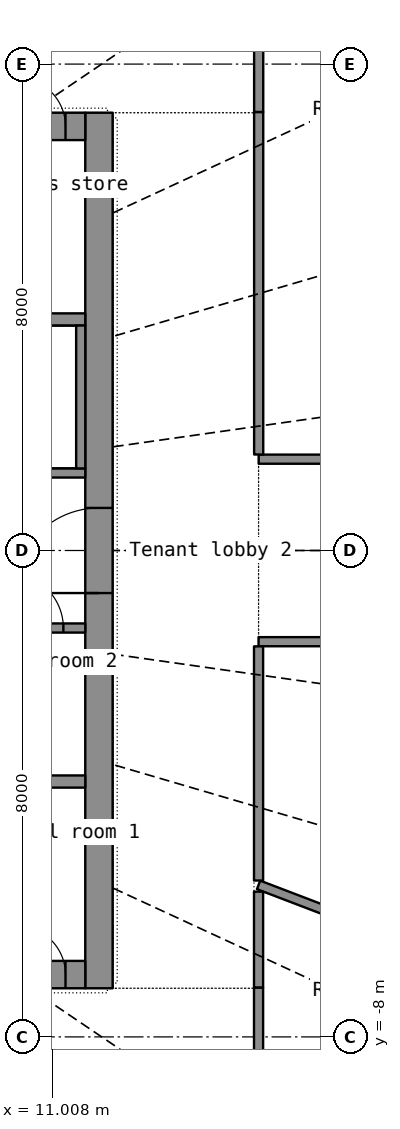
"""IFC4 building model, lengths in metres.
Left out: names, types, materials, properties, quantities, classifications, styles, units other than length and angle.
Written with IfcOpenShell. Run it as: python <this file> out.ifc"""

import sys

from ifc_helpers import new_model, si_unit, direction, frame, frame_2d, origin, place, context, subcontext, project, spatial, rectangle, extrude, element, fill, save


model = new_model("IFC4")
c1 = context("Model", 3, precision=1e-05, world=origin(), true_north=direction((0.0, 1.0)))
c2 = subcontext(c1, "Body", "Model", "MODEL_VIEW")
j1 = project(units=[si_unit("LENGTHUNIT", "METRE"), si_unit("PLANEANGLEUNIT", "RADIAN")], contexts=[c1])
p1 = place(None, origin())
s1 = spatial("IfcSite", under=j1, at=p1, CompositionType="ELEMENT")
p2 = place(p1, origin())
s2 = spatial("IfcBuilding", under=s1, at=p2, CompositionType="ELEMENT")
p3 = place(p2, frame((0.0, 0.0, 157.1)))
s3 = spatial("IfcBuildingStorey", under=s2, at=p3, CompositionType="ELEMENT", Elevation=157.1)
p4 = place(p3, frame((11.775, -7.2, 0.0), z_axis=(0.0, 0.0, 1.0), x_axis=(0.0, 1.0, 0.0)))
e1 = element("IfcWall", 1, at=p4, inside=s3, PredefinedType="SHEAR", context=c2, shape_type="SweptSolid", body=[
    extrude(rectangle(XDim=14.4, YDim=0.45, at=frame_2d((7.2, 0.0))), origin(), (0.0, 0.0, 1.0), 3.3),
])
p5 = place(p4, frame((6.5, 0.0, 0.0)))
e2 = element("IfcOpeningElement", 2, at=p5, cuts=e1, PredefinedType="OPENING", context=c2, shape_type="SweptSolid", body=[
    extrude(rectangle(XDim=1.4, YDim=2.2, at=frame_2d((0.7, 1.1))), frame((0.0, 0.235, 0.0), z_axis=(0.0, -1.0, 0.0), x_axis=(1.0, 0.0, 0.0)), (0.0, 0.0, 1.0), 0.47),
])
p6 = place(p3, frame((-11.55, -6.975, 0.0), z_axis=(0.0, 0.0, 1.0), x_axis=(1.0, 0.0, 0.0)))
e3 = element("IfcWall", 3, at=p6, inside=s3, PredefinedType="SHEAR", context=c2, shape_type="SweptSolid", body=[
    extrude(rectangle(XDim=23.1, YDim=0.45, at=frame_2d((11.55, 0.0))), origin(), (0.0, 0.0, 1.0), 3.3),
])
p7 = place(p6, frame((20.0, 0.0, 0.0)))
e4 = element("IfcOpeningElement", 4, at=p7, cuts=e3, PredefinedType="OPENING", context=c2, shape_type="SweptSolid", body=[
    extrude(rectangle(XDim=1.1, YDim=2.2, at=frame_2d((0.55, 1.1))), frame((0.0, 0.235, 0.0), z_axis=(0.0, -1.0, 0.0), x_axis=(1.0, 0.0, 0.0)), (0.0, 0.0, 1.0), 0.47),
])
p8 = place(p6, frame((3.1, 0.0, 0.0)))
e5 = element("IfcOpeningElement", 5, at=p8, cuts=e3, PredefinedType="OPENING", context=c2, shape_type="SweptSolid", body=[
    extrude(rectangle(XDim=0.9, YDim=2.1, at=frame_2d((0.45, 1.05))), frame((0.0, 0.235, 0.0), z_axis=(0.0, -1.0, 0.0), x_axis=(1.0, 0.0, 0.0)), (0.0, 0.0, 1.0), 0.47),
])
p9 = place(p6, frame((9.1, 0.0, 0.0)))
e6 = element("IfcOpeningElement", 6, at=p9, cuts=e3, PredefinedType="OPENING", context=c2, shape_type="SweptSolid", body=[
    extrude(rectangle(XDim=0.9, YDim=2.1, at=frame_2d((0.45, 1.05))), frame((0.0, 0.235, 0.0), z_axis=(0.0, -1.0, 0.0), x_axis=(1.0, 0.0, 0.0)), (0.0, 0.0, 1.0), 0.47),
])
p10 = place(p6, frame((16.1, 0.0, 0.0)))
e7 = element("IfcOpeningElement", 7, at=p10, cuts=e3, PredefinedType="OPENING", context=c2, shape_type="SweptSolid", body=[
    extrude(rectangle(XDim=0.9, YDim=2.1, at=frame_2d((0.45, 1.05))), frame((0.0, 0.235, 0.0), z_axis=(0.0, -1.0, 0.0), x_axis=(1.0, 0.0, 0.0)), (0.0, 0.0, 1.0), 0.47),
])
p11 = place(p6, frame((0.325, 0.0, 0.0)))
e8 = element("IfcOpeningElement", 8, at=p11, cuts=e3, PredefinedType="OPENING", context=c2, shape_type="SweptSolid", body=[
    extrude(rectangle(XDim=0.8, YDim=2.05, at=frame_2d((0.4, 1.025))), frame((0.0, 0.235, 0.0), z_axis=(0.0, -1.0, 0.0), x_axis=(1.0, 0.0, 0.0)), (0.0, 0.0, 1.0), 0.47),
])
p12 = place(p6, frame((21.975, 0.0, 0.0)))
e9 = element("IfcOpeningElement", 9, at=p12, cuts=e3, PredefinedType="OPENING", context=c2, shape_type="SweptSolid", body=[
    extrude(rectangle(XDim=0.8, YDim=2.05, at=frame_2d((0.4, 1.025))), frame((0.0, 0.235, 0.0), z_axis=(0.0, -1.0, 0.0), x_axis=(1.0, 0.0, 0.0)), (0.0, 0.0, 1.0), 0.47),
])
p13 = place(p3, frame((-11.55, 6.975, 0.0), z_axis=(0.0, 0.0, 1.0), x_axis=(1.0, 0.0, 0.0)))
e10 = element("IfcWall", 10, at=p13, inside=s3, PredefinedType="SHEAR", context=c2, shape_type="SweptSolid", body=[
    extrude(rectangle(XDim=23.1, YDim=0.45, at=frame_2d((11.55, 0.0))), origin(), (0.0, 0.0, 1.0), 3.3),
])
p14 = place(p13, frame((2.0, 0.0, 0.0)))
e11 = element("IfcOpeningElement", 11, at=p14, cuts=e10, PredefinedType="OPENING", context=c2, shape_type="SweptSolid", body=[
    extrude(rectangle(XDim=1.1, YDim=2.2, at=frame_2d((0.55, 1.1))), frame((0.0, 0.235, 0.0), z_axis=(0.0, -1.0, 0.0), x_axis=(1.0, 0.0, 0.0)), (0.0, 0.0, 1.0), 0.47),
])
p15 = place(p13, frame((6.0, 0.0, 0.0)))
e12 = element("IfcOpeningElement", 12, at=p15, cuts=e10, PredefinedType="OPENING", context=c2, shape_type="SweptSolid", body=[
    extrude(rectangle(XDim=1.1, YDim=2.2, at=frame_2d((0.55, 1.1))), frame((0.0, 0.235, 0.0), z_axis=(0.0, -1.0, 0.0), x_axis=(1.0, 0.0, 0.0)), (0.0, 0.0, 1.0), 0.47),
])
p16 = place(p13, frame((8.0, 0.0, 0.0)))
e13 = element("IfcOpeningElement", 13, at=p16, cuts=e10, PredefinedType="OPENING", context=c2, shape_type="SweptSolid", body=[
    extrude(rectangle(XDim=1.1, YDim=2.2, at=frame_2d((0.55, 1.1))), frame((0.0, 0.235, 0.0), z_axis=(0.0, -1.0, 0.0), x_axis=(1.0, 0.0, 0.0)), (0.0, 0.0, 1.0), 0.47),
])
p17 = place(p13, frame((10.0, 0.0, 0.0)))
e14 = element("IfcOpeningElement", 14, at=p17, cuts=e10, PredefinedType="OPENING", context=c2, shape_type="SweptSolid", body=[
    extrude(rectangle(XDim=1.1, YDim=2.2, at=frame_2d((0.55, 1.1))), frame((0.0, 0.235, 0.0), z_axis=(0.0, -1.0, 0.0), x_axis=(1.0, 0.0, 0.0)), (0.0, 0.0, 1.0), 0.47),
])
p18 = place(p13, frame((12.0, 0.0, 0.0)))
e15 = element("IfcOpeningElement", 15, at=p18, cuts=e10, PredefinedType="OPENING", context=c2, shape_type="SweptSolid", body=[
    extrude(rectangle(XDim=1.1, YDim=2.2, at=frame_2d((0.55, 1.1))), frame((0.0, 0.235, 0.0), z_axis=(0.0, -1.0, 0.0), x_axis=(1.0, 0.0, 0.0)), (0.0, 0.0, 1.0), 0.47),
])
p19 = place(p13, frame((14.0, 0.0, 0.0)))
e16 = element("IfcOpeningElement", 16, at=p19, cuts=e10, PredefinedType="OPENING", context=c2, shape_type="SweptSolid", body=[
    extrude(rectangle(XDim=1.1, YDim=2.2, at=frame_2d((0.55, 1.1))), frame((0.0, 0.235, 0.0), z_axis=(0.0, -1.0, 0.0), x_axis=(1.0, 0.0, 0.0)), (0.0, 0.0, 1.0), 0.47),
])
p20 = place(p13, frame((16.0, 0.0, 0.0)))
e17 = element("IfcOpeningElement", 17, at=p20, cuts=e10, PredefinedType="OPENING", context=c2, shape_type="SweptSolid", body=[
    extrude(rectangle(XDim=1.1, YDim=2.2, at=frame_2d((0.55, 1.1))), frame((0.0, 0.235, 0.0), z_axis=(0.0, -1.0, 0.0), x_axis=(1.0, 0.0, 0.0)), (0.0, 0.0, 1.0), 0.47),
])
p21 = place(p13, frame((18.0, 0.0, 0.0)))
e18 = element("IfcOpeningElement", 18, at=p21, cuts=e10, PredefinedType="OPENING", context=c2, shape_type="SweptSolid", body=[
    extrude(rectangle(XDim=1.1, YDim=2.2, at=frame_2d((0.55, 1.1))), frame((0.0, 0.235, 0.0), z_axis=(0.0, -1.0, 0.0), x_axis=(1.0, 0.0, 0.0)), (0.0, 0.0, 1.0), 0.47),
])
p22 = place(p13, frame((20.0, 0.0, 0.0)))
e19 = element("IfcOpeningElement", 19, at=p22, cuts=e10, PredefinedType="OPENING", context=c2, shape_type="SweptSolid", body=[
    extrude(rectangle(XDim=1.1, YDim=2.2, at=frame_2d((0.55, 1.1))), frame((0.0, 0.235, 0.0), z_axis=(0.0, -1.0, 0.0), x_axis=(1.0, 0.0, 0.0)), (0.0, 0.0, 1.0), 0.47),
])
p23 = place(p13, frame((4.1, 0.0, 0.0)))
e20 = element("IfcOpeningElement", 20, at=p23, cuts=e10, PredefinedType="OPENING", context=c2, shape_type="SweptSolid", body=[
    extrude(rectangle(XDim=0.9, YDim=2.1, at=frame_2d((0.45, 1.05))), frame((0.0, 0.235, 0.0), z_axis=(0.0, -1.0, 0.0), x_axis=(1.0, 0.0, 0.0)), (0.0, 0.0, 1.0), 0.47),
])
p24 = place(p13, frame((0.325, 0.0, 0.0)))
e21 = element("IfcOpeningElement", 21, at=p24, cuts=e10, PredefinedType="OPENING", context=c2, shape_type="SweptSolid", body=[
    extrude(rectangle(XDim=0.8, YDim=2.05, at=frame_2d((0.4, 1.025))), frame((0.0, 0.235, 0.0), z_axis=(0.0, -1.0, 0.0), x_axis=(1.0, 0.0, 0.0)), (0.0, 0.0, 1.0), 0.47),
])
p25 = place(p13, frame((21.975, 0.0, 0.0)))
e22 = element("IfcOpeningElement", 22, at=p25, cuts=e10, PredefinedType="OPENING", context=c2, shape_type="SweptSolid", body=[
    extrude(rectangle(XDim=0.8, YDim=2.05, at=frame_2d((0.4, 1.025))), frame((0.0, 0.235, 0.0), z_axis=(0.0, -1.0, 0.0), x_axis=(1.0, 0.0, 0.0)), (0.0, 0.0, 1.0), 0.47),
])
for number, where, z_axis, x_axis in (
    (23, (-11.55, -3.8, 0.0), (0.0, 0.0, 1.0), (1.0, 0.0, 0.0)),
    (24, (-11.55, 3.8, 0.0), (0.0, 0.0, 1.0), (1.0, 0.0, 0.0)),
):
    element("IfcWall", number, at=place(p3, frame(where, z_axis=z_axis, x_axis=x_axis)), inside=s3, PredefinedType="SHEAR", context=c2, shape_type="SweptSolid", body=[
        extrude(rectangle(XDim=23.1, YDim=0.2, at=frame_2d((11.55, 0.0))), origin(), (0.0, 0.0, 1.0), 3.3),
    ])
p26 = place(p3, frame((3.0, -1.275, 0.0), z_axis=(0.0, 0.0, 1.0), x_axis=(1.0, 0.0, 0.0)))
e25 = element("IfcWall", 25, at=p26, inside=s3, PredefinedType="PARTITIONING", context=c2, shape_type="SweptSolid", body=[
    extrude(rectangle(XDim=8.55, YDim=0.15, at=frame_2d((4.275, 0.0))), origin(), (0.0, 0.0, 1.0), 3.3),
])
p27 = place(p26, frame((0.441, 0.0, 0.0)))
e26 = element("IfcOpeningElement", 26, at=p27, cuts=e25, PredefinedType="OPENING", context=c2, shape_type="SweptSolid", body=[
    extrude(rectangle(XDim=0.9, YDim=2.1, at=frame_2d((0.45, 1.05))), frame((0.0, 0.085, 0.0), z_axis=(0.0, -1.0, 0.0), x_axis=(1.0, 0.0, 0.0)), (0.0, 0.0, 1.0), 0.17),
])
p28 = place(p26, frame((2.722, 0.0, 0.0)))
e27 = element("IfcOpeningElement", 27, at=p28, cuts=e25, PredefinedType="OPENING", context=c2, shape_type="SweptSolid", body=[
    extrude(rectangle(XDim=0.85, YDim=2.1, at=frame_2d((0.425, 1.05))), frame((0.0, 0.085, 0.0), z_axis=(0.0, -1.0, 0.0), x_axis=(1.0, 0.0, 0.0)), (0.0, 0.0, 1.0), 0.17),
])
p29 = place(p26, frame((5.221, 0.0, 0.0)))
e28 = element("IfcOpeningElement", 28, at=p29, cuts=e25, PredefinedType="OPENING", context=c2, shape_type="SweptSolid", body=[
    extrude(rectangle(XDim=0.85, YDim=2.1, at=frame_2d((0.425, 1.05))), frame((0.0, 0.085, 0.0), z_axis=(0.0, -1.0, 0.0), x_axis=(1.0, 0.0, 0.0)), (0.0, 0.0, 1.0), 0.17),
])
p30 = place(p26, frame((7.29, 0.0, 0.0)))
e29 = element("IfcOpeningElement", 29, at=p30, cuts=e25, PredefinedType="OPENING", context=c2, shape_type="SweptSolid", body=[
    extrude(rectangle(XDim=0.9, YDim=2.1, at=frame_2d((0.45, 1.05))), frame((0.0, 0.085, 0.0), z_axis=(0.0, -1.0, 0.0), x_axis=(1.0, 0.0, 0.0)), (0.0, 0.0, 1.0), 0.17),
])
p31 = place(p3, frame((3.0, 1.275, 0.0), z_axis=(0.0, 0.0, 1.0), x_axis=(1.0, 0.0, 0.0)))
e30 = element("IfcWall", 30, at=p31, inside=s3, PredefinedType="SHEAR", context=c2, shape_type="SweptSolid", body=[
    extrude(rectangle(XDim=8.55, YDim=0.15, at=frame_2d((4.275, 0.0))), origin(), (0.0, 0.0, 1.0), 3.3),
])
p32 = place(p31, frame((2.05, 0.0, 0.0)))
e31 = element("IfcOpeningElement", 31, at=p32, cuts=e30, PredefinedType="OPENING", context=c2, shape_type="SweptSolid", body=[
    extrude(rectangle(XDim=1.1, YDim=2.15, at=frame_2d((0.55, 1.075))), frame((0.0, 0.085, 0.0), z_axis=(0.0, -1.0, 0.0), x_axis=(1.0, 0.0, 0.0)), (0.0, 0.0, 1.0), 0.17),
])
p33 = place(p31, frame((0.45, 0.0, 0.0)))
e32 = element("IfcOpeningElement", 32, at=p33, cuts=e30, PredefinedType="OPENING", context=c2, shape_type="SweptSolid", body=[
    extrude(rectangle(XDim=0.9, YDim=2.1, at=frame_2d((0.45, 1.05))), frame((0.0, 0.085, 0.0), z_axis=(0.0, -1.0, 0.0), x_axis=(1.0, 0.0, 0.0)), (0.0, 0.0, 1.0), 0.17),
])
p34 = place(p3, frame((11.475, 1.35, 0.0), z_axis=(0.0, 0.0, 1.0), x_axis=(0.0, 1.0, 0.0)))
e33 = element("IfcWall", 33, at=p34, inside=s3, PredefinedType="SHEAR", context=c2, shape_type="SweptSolid", body=[
    extrude(rectangle(XDim=2.35, YDim=0.15, at=frame_2d((1.175, 0.0))), origin(), (0.0, 0.0, 1.0), 3.3),
])
p35 = place(p3, frame((21.56, -8.235, 0.0), z_axis=(0.0, 0.0, 1.0), x_axis=(-0.93417148, 0.356824391, 0.0)))
e34 = element("IfcWall", 34, at=p35, inside=s3, PredefinedType="PARTITIONING", context=c2, shape_type="SweptSolid", body=[
    extrude(rectangle(XDim=7.665, YDim=0.15, at=frame_2d((3.832, 0.0))), origin(), (0.0, 0.0, 1.0), 2.4),
])
p36 = place(p3, frame((21.202, 1.5, 0.0), z_axis=(0.0, 0.0, 1.0), x_axis=(-0.999999948, 0.000323148, 0.0)))
e35 = element("IfcWall", 35, at=p36, inside=s3, PredefinedType="PARTITIONING", context=c2, shape_type="SweptSolid", body=[
    extrude(rectangle(XDim=6.8, YDim=0.15, at=frame_2d((3.4, 0.0))), origin(), (0.0, 0.0, 1.0), 2.4),
])
p37 = place(p36, frame((2.8, 0.0, 0.0)))
e36 = element("IfcOpeningElement", 36, at=p37, cuts=e35, PredefinedType="OPENING", context=c2, shape_type="SweptSolid", body=[
    extrude(rectangle(XDim=1.2, YDim=2.2, at=frame_2d((0.6, 1.1))), frame((0.0, 0.085, 0.0), z_axis=(0.0, -1.0, 0.0), x_axis=(1.0, 0.0, 0.0)), (0.0, 0.0, 1.0), 0.17),
])
p38 = place(p3, frame((14.4, -1.5, 0.0), z_axis=(0.0, 0.0, 1.0), x_axis=(1.0, 0.0, 0.0)))
e37 = element("IfcWall", 37, at=p38, inside=s3, PredefinedType="PARTITIONING", context=c2, shape_type="SweptSolid", body=[
    extrude(rectangle(XDim=6.532, YDim=0.15, at=frame_2d((3.266, 0.0))), origin(), (0.0, 0.0, 1.0), 2.4),
])
p39 = place(p38, frame((2.791, 0.0, 0.0)))
e38 = element("IfcOpeningElement", 38, at=p39, cuts=e37, PredefinedType="OPENING", context=c2, shape_type="SweptSolid", body=[
    extrude(rectangle(XDim=0.95, YDim=2.15, at=frame_2d((0.475, 1.075))), frame((0.0, 0.085, 0.0), z_axis=(0.0, -1.0, 0.0), x_axis=(1.0, 0.0, 0.0)), (0.0, 0.0, 1.0), 0.17),
])
p40 = place(p3, frame((14.402, 1.579, 0.0), z_axis=(0.0, 0.0, 1.0), x_axis=(0.0, 1.0, 0.0)))
e39 = element("IfcWall", 39, at=p40, inside=s3, PredefinedType="PARTITIONING", context=c2, shape_type="SweptSolid", body=[
    extrude(rectangle(XDim=5.633, YDim=0.15, at=frame_2d((2.816, 0.0))), origin(), (0.0, 0.0, 1.0), 2.4),
])
p41 = place(p3, frame((14.4, -5.428, 0.0), z_axis=(0.0, 0.0, 1.0), x_axis=(0.0, 1.0, 0.0)))
e40 = element("IfcWall", 40, at=p41, inside=s3, PredefinedType="PARTITIONING", context=c2, shape_type="SweptSolid", body=[
    extrude(rectangle(XDim=3.851, YDim=0.15, at=frame_2d((1.926, 0.0))), origin(), (0.0, 0.0, 1.0), 2.4),
])
p42 = place(p3, frame((14.402, 7.213, 0.0), z_axis=(0.0, 0.0, 1.0), x_axis=(0.0, 1.0, 0.0)))
e41 = element("IfcWall", 41, at=p42, inside=s3, PredefinedType="PARTITIONING", context=c2, shape_type="SweptSolid", body=[
    extrude(rectangle(XDim=2.312, YDim=0.15, at=frame_2d((1.156, 0.0))), origin(), (0.0, 0.0, 1.0), 2.4),
])
p43 = place(p3, frame((14.4, -9.523, 0.0), z_axis=(0.0, 0.0, 1.0), x_axis=(0.0, 1.0, 0.0)))
e42 = element("IfcWall", 42, at=p43, inside=s3, PredefinedType="PARTITIONING", context=c2, shape_type="SweptSolid", body=[
    extrude(rectangle(XDim=2.335, YDim=0.15, at=frame_2d((1.167, 0.0))), origin(), (0.0, 0.0, 1.0), 2.4),
])
p44 = place(p3, frame((14.4, -7.187, 0.0), z_axis=(0.0, 0.0, 1.0), x_axis=(0.0, 1.0, 0.0)))
e43 = element("IfcWall", 43, at=p44, inside=s3, PredefinedType="PARTITIONING", context=c2, shape_type="SweptSolid", body=[
    extrude(rectangle(XDim=1.576, YDim=0.15, at=frame_2d((0.788, 0.0))), origin(), (0.0, 0.0, 1.0), 2.4),
])
p45 = place(p12, origin())
e44 = element("IfcDoor", 44, at=p45, inside=s3, OperationType="SINGLE_SWING_LEFT", PredefinedType="DOOR", context=c2, shape_type="SweptSolid", body=[
    extrude(rectangle(XDim=0.8, YDim=2.05, at=frame_2d((0.4, 1.025))), frame((0.0, 0.025, 0.0), z_axis=(0.0, -1.0, 0.0), x_axis=(1.0, 0.0, 0.0)), (0.0, 0.0, 1.0), 0.05),
])
fill(e9, e44)
p46 = place(p25, origin())
e45 = element("IfcDoor", 45, at=p46, inside=s3, OperationType="SINGLE_SWING_LEFT", PredefinedType="DOOR", context=c2, shape_type="SweptSolid", body=[
    extrude(rectangle(XDim=0.8, YDim=2.05, at=frame_2d((0.4, 1.025))), frame((0.0, 0.025, 0.0), z_axis=(0.0, -1.0, 0.0), x_axis=(1.0, 0.0, 0.0)), (0.0, 0.0, 1.0), 0.05),
])
fill(e22, e45)
p47 = place(p5, origin())
e46 = element("IfcDoor", 46, at=p47, inside=s3, OperationType="DOUBLE_DOOR_SINGLE_SWING", PredefinedType="DOOR", context=c2, shape_type="SweptSolid", body=[
    extrude(rectangle(XDim=1.4, YDim=2.2, at=frame_2d((0.7, 1.1))), frame((0.0, 0.025, 0.0), z_axis=(0.0, -1.0, 0.0), x_axis=(1.0, 0.0, 0.0)), (0.0, 0.0, 1.0), 0.05),
])
fill(e2, e46)
p48 = place(p30, origin())
e47 = element("IfcDoor", 47, at=p48, inside=s3, OperationType="SINGLE_SWING_LEFT", PredefinedType="DOOR", context=c2, shape_type="SweptSolid", body=[
    extrude(rectangle(XDim=0.9, YDim=2.1, at=frame_2d((0.45, 1.05))), frame((0.0, 0.025, 0.0), z_axis=(0.0, -1.0, 0.0), x_axis=(1.0, 0.0, 0.0)), (0.0, 0.0, 1.0), 0.05),
])
fill(e29, e47)
save(model, sys.argv[1])
